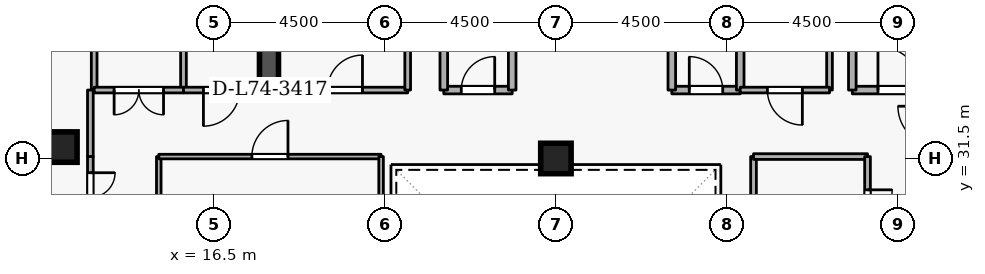
"""IFC4 building model, lengths in metres.
Left out: names, types, materials, properties, quantities, classifications, styles, units other than length and angle.
Written with IfcOpenShell. Run it as: python <this file> out.ifc"""

import sys

from ifc_helpers import new_model, si_unit, direction, frame, frame_2d, origin, origin_2d, place, context, subcontext, project, spatial, rectangle, extrude, element, fill, save


model = new_model("IFC4")
c1 = context("Model", 3, precision=1e-05, world=origin(), true_north=direction((0.0, 1.0)))
c2 = subcontext(c1, "Body", "Model", "MODEL_VIEW")
j1 = project(units=[si_unit("LENGTHUNIT", "METRE"), si_unit("PLANEANGLEUNIT", "RADIAN")], contexts=[c1])
p1 = place(None, origin())
s1 = spatial("IfcSite", under=j1, at=p1, CompositionType="ELEMENT")
p2 = place(p1, origin())
s2 = spatial("IfcBuilding", under=s1, at=p2, CompositionType="ELEMENT")
p3 = place(p2, frame((0.0, 0.0, 276.3)))
s3 = spatial("IfcBuildingStorey", under=s2, at=p3, CompositionType="ELEMENT", Elevation=276.3)
p4 = place(p3, frame((17.95, 33.1, 0.0), z_axis=(0.0, 0.0, 1.0), x_axis=(0.0, 1.0, 0.0)))
e1 = element("IfcWall", 1, at=p4, inside=s3, PredefinedType="SHEAR", context=c2, shape_type="SweptSolid", body=[
    extrude(rectangle(XDim=5.8, YDim=0.5, at=frame_2d((2.9, 0.0))), origin(), (0.0, 0.0, 1.0), 3.6),
])
for number, where, z_axis, x_axis in (
    (2, (12.5, 31.8, 0.0), (0.0, 0.0, 1.0), (1.0, 0.0, 0.0)),
    (3, (25.5, 31.5, 0.0), (0.0, 0.0, 1.0), (1.0, 0.0, 0.0)),
):
    element("IfcColumn", number, at=place(p3, frame(where, z_axis=z_axis, x_axis=x_axis)), inside=s3, PredefinedType="COLUMN", context=c2, shape_type="SweptSolid", body=[
        extrude(rectangle(XDim=0.8, YDim=0.8, at=origin_2d()), origin(), (0.0, 0.0, 1.0), 3.6),
    ])
p5 = place(p3, frame((33.3, 33.3, 0.0), z_axis=(0.0, 0.0, 1.0), x_axis=(1.0, 0.0, 0.0)))
e4 = element("IfcWall", 4, at=p5, inside=s3, PredefinedType="STANDARD", context=c2, shape_type="SweptSolid", body=[
    extrude(rectangle(XDim=2.5, YDim=0.2, at=frame_2d((1.25, 0.0))), origin(), (0.0, 0.0, 1.0), 3.26),
])
p6 = place(p5, frame((0.675, 0.0, 0.0)))
e5 = element("IfcOpeningElement", 5, at=p6, cuts=e4, PredefinedType="OPENING", context=c2, shape_type="SweptSolid", body=[
    extrude(rectangle(XDim=1.15, YDim=2.1, at=frame_2d((0.575, 1.05))), frame((0.0, 0.11, 0.0), z_axis=(0.0, -1.0, 0.0), x_axis=(1.0, 0.0, 0.0)), (0.0, 0.0, 1.0), 0.22),
])
p7 = place(p3, frame((33.3, 35.6, 0.0), z_axis=(0.0, 0.0, 1.0), x_axis=(0.0, -1.0, 0.0)))
e6 = element("IfcWall", 6, at=p7, inside=s3, PredefinedType="STANDARD", context=c2, shape_type="SweptSolid", body=[
    extrude(rectangle(XDim=2.3, YDim=0.2, at=frame_2d((1.15, 0.0))), origin(), (0.0, 0.0, 1.0), 2.465),
])
p8 = place(p3, frame((22.55, 33.3, 0.0), z_axis=(0.0, 0.0, 1.0), x_axis=(1.0, 0.0, 0.0)))
e7 = element("IfcWall", 7, at=p8, inside=s3, PredefinedType="STANDARD", context=c2, shape_type="SweptSolid", body=[
    extrude(rectangle(XDim=1.8, YDim=0.2, at=frame_2d((0.9, 0.0))), origin(), (0.0, 0.0, 1.0), 3.26),
])
p9 = place(p8, frame((0.46, 0.0, 0.0)))
e8 = element("IfcOpeningElement", 8, at=p9, cuts=e7, PredefinedType="OPENING", context=c2, shape_type="SweptSolid", body=[
    extrude(rectangle(XDim=0.88, YDim=2.04, at=frame_2d((0.44, 1.02))), frame((0.0, 0.11, 0.0), z_axis=(0.0, -1.0, 0.0), x_axis=(1.0, 0.0, 0.0)), (0.0, 0.0, 1.0), 0.22),
])
for number, where, z_axis, x_axis in (
    (9, (24.35, 33.3, 0.0), (0.0, 0.0, 1.0), (0.0, 1.0, 0.0)),
    (10, (22.55, 35.35, 0.0), (0.0, 0.0, 1.0), (0.0, -1.0, 0.0)),
):
    element("IfcWall", number, at=place(p3, frame(where, z_axis=z_axis, x_axis=x_axis)), inside=s3, PredefinedType="STANDARD", context=c2, shape_type="SweptSolid", body=[
        extrude(rectangle(XDim=2.05, YDim=0.2, at=frame_2d((1.025, 0.0))), origin(), (0.0, 0.0, 1.0), 3.26),
    ])
p10 = place(p3, frame((28.55, 33.3, 0.0), z_axis=(0.0, 0.0, 1.0), x_axis=(1.0, 0.0, 0.0)))
e11 = element("IfcWall", 11, at=p10, inside=s3, PredefinedType="STANDARD", context=c2, shape_type="SweptSolid", body=[
    extrude(rectangle(XDim=1.8, YDim=0.2, at=frame_2d((0.9, 0.0))), origin(), (0.0, 0.0, 1.0), 3.26),
])
p11 = place(p10, frame((0.46, 0.0, 0.0)))
e12 = element("IfcOpeningElement", 12, at=p11, cuts=e11, PredefinedType="OPENING", context=c2, shape_type="SweptSolid", body=[
    extrude(rectangle(XDim=0.88, YDim=2.04, at=frame_2d((0.44, 1.02))), frame((0.0, 0.11, 0.0), z_axis=(0.0, -1.0, 0.0), x_axis=(1.0, 0.0, 0.0)), (0.0, 0.0, 1.0), 0.22),
])
for number, where, z_axis, x_axis in (
    (13, (30.35, 33.3, 0.0), (0.0, 0.0, 1.0), (0.0, 1.0, 0.0)),
    (14, (28.55, 35.35, 0.0), (0.0, 0.0, 1.0), (0.0, -1.0, 0.0)),
):
    element("IfcWall", number, at=place(p3, frame(where, z_axis=z_axis, x_axis=x_axis)), inside=s3, PredefinedType="STANDARD", context=c2, shape_type="SweptSolid", body=[
        extrude(rectangle(XDim=2.05, YDim=0.2, at=frame_2d((1.025, 0.0))), origin(), (0.0, 0.0, 1.0), 3.26),
    ])
p12 = place(p3, frame((18.3, 33.3, 0.0), z_axis=(0.0, 0.0, 1.0), x_axis=(1.0, 0.0, 0.0)))
e15 = element("IfcWall", 15, at=p12, inside=s3, PredefinedType="PARTITIONING", context=c2, shape_type="SweptSolid", body=[
    extrude(rectangle(XDim=3.3, YDim=0.15, at=frame_2d((1.65, 0.0))), origin(), (0.0, 0.0, 1.0), 3.26),
])
p13 = place(p12, frame((1.19, 0.0, 0.0)))
e16 = element("IfcOpeningElement", 16, at=p13, cuts=e15, PredefinedType="OPENING", context=c2, shape_type="SweptSolid", body=[
    extrude(rectangle(XDim=0.92, YDim=2.08, at=frame_2d((0.46, 1.04))), frame((0.0, 0.085, 0.0), z_axis=(0.0, -1.0, 0.0), x_axis=(1.0, 0.0, 0.0)), (0.0, 0.0, 1.0), 0.17),
])
p14 = place(p3, frame((21.6, 33.3, 0.0), z_axis=(0.0, 0.0, 1.0), x_axis=(0.0, 1.0, 0.0)))
e17 = element("IfcWall", 17, at=p14, inside=s3, PredefinedType="PARTITIONING", context=c2, shape_type="SweptSolid", body=[
    extrude(rectangle(XDim=2.05, YDim=0.15, at=frame_2d((1.025, 0.0))), origin(), (0.0, 0.0, 1.0), 3.26),
])
p15 = place(p3, frame((32.7, 35.35, 0.0), z_axis=(0.0, 0.0, 1.0), x_axis=(0.0, -1.0, 0.0)))
e18 = element("IfcWall", 18, at=p15, inside=s3, PredefinedType="PARTITIONING", context=c2, shape_type="SweptSolid", body=[
    extrude(rectangle(XDim=2.05, YDim=0.15, at=frame_2d((1.025, 0.0))), origin(), (0.0, 0.0, 1.0), 2.465),
])
p16 = place(p3, frame((32.7, 33.3, 0.0), z_axis=(0.0, 0.0, 1.0), x_axis=(-1.0, 0.0, 0.0)))
e19 = element("IfcWall", 19, at=p16, inside=s3, PredefinedType="PARTITIONING", context=c2, shape_type="SweptSolid", body=[
    extrude(rectangle(XDim=2.35, YDim=0.15, at=frame_2d((1.175, 0.0))), origin(), (0.0, 0.0, 1.0), 3.26),
])
p17 = place(p16, frame((0.715, 0.0, 0.0)))
e20 = element("IfcOpeningElement", 20, at=p17, cuts=e19, PredefinedType="OPENING", context=c2, shape_type="SweptSolid", body=[
    extrude(rectangle(XDim=0.92, YDim=2.08, at=frame_2d((0.46, 1.04))), frame((0.0, 0.085, 0.0), z_axis=(0.0, -1.0, 0.0), x_axis=(1.0, 0.0, 0.0)), (0.0, 0.0, 1.0), 0.17),
])
for number, where, z_axis, x_axis in (
    (21, (13.35, 33.3, 0.0), (0.0, 0.0, 1.0), (0.0, 1.0, 0.0)),
    (22, (15.7, 44.72, 0.0), (0.0, 0.0, 1.0), (0.0, -1.0, 0.0)),
):
    element("IfcWall", number, at=place(p3, frame(where, z_axis=z_axis, x_axis=x_axis)), inside=s3, PredefinedType="PARTITIONING", context=c2, shape_type="SweptSolid", body=[
        extrude(rectangle(XDim=11.42, YDim=0.15, at=frame_2d((5.71, 0.0))), origin(), (0.0, 0.0, 1.0), 3.26),
    ])
p18 = place(p3, frame((15.7, 33.3, 0.0), z_axis=(0.0, 0.0, 1.0), x_axis=(-1.0, 0.0, 0.0)))
e23 = element("IfcWall", 23, at=p18, inside=s3, PredefinedType="PARTITIONING", context=c2, shape_type="SweptSolid", body=[
    extrude(rectangle(XDim=2.35, YDim=0.15, at=frame_2d((1.175, 0.0))), origin(), (0.0, 0.0, 1.0), 3.26),
])
p19 = place(p18, frame((0.525, 0.0, 0.0)))
e24 = element("IfcOpeningElement", 24, at=p19, cuts=e23, PredefinedType="OPENING", context=c2, shape_type="SweptSolid", body=[
    extrude(rectangle(XDim=1.3, YDim=2.12, at=frame_2d((0.65, 1.06))), frame((0.0, 0.085, 0.0), z_axis=(0.0, -1.0, 0.0), x_axis=(1.0, 0.0, 0.0)), (0.0, 0.0, 1.0), 0.17),
])
p20 = place(p3, frame((17.7, 33.3, 0.0), z_axis=(0.0, 0.0, 1.0), x_axis=(-1.0, 0.0, 0.0)))
e25 = element("IfcWall", 25, at=p20, inside=s3, PredefinedType="PARTITIONING", context=c2, shape_type="SweptSolid", body=[
    extrude(rectangle(XDim=2.0, YDim=0.15, at=frame_2d((1.0, 0.0))), origin(), (0.0, 0.0, 1.0), 3.26),
])
p21 = place(p20, frame((0.525, 0.0, 0.0)))
e26 = element("IfcOpeningElement", 26, at=p21, cuts=e25, PredefinedType="OPENING", context=c2, shape_type="SweptSolid", body=[
    extrude(rectangle(XDim=0.95, YDim=2.1, at=frame_2d((0.475, 1.05))), frame((0.0, 0.085, 0.0), z_axis=(0.0, -1.0, 0.0), x_axis=(1.0, 0.0, 0.0)), (0.0, 0.0, 1.0), 0.17),
])
p22 = place(p3, frame((13.25, 33.3, 0.0), z_axis=(0.0, 0.0, 1.0), x_axis=(0.0, -1.0, 0.0)))
e27 = element("IfcWall", 27, at=p22, inside=s3, PredefinedType="PARTITIONING", context=c2, shape_type="SweptSolid", body=[
    extrude(rectangle(XDim=1.75, YDim=0.15, at=frame_2d((0.875, 0.0))), origin(), (0.0, 0.0, 1.0), 3.26),
])
p23 = place(p3, frame((13.25, 31.55, 0.0), z_axis=(0.0, 0.0, 1.0), x_axis=(0.0, -1.0, 0.0)))
e28 = element("IfcWall", 28, at=p23, inside=s3, PredefinedType="PARTITIONING", context=c2, shape_type="SweptSolid", body=[
    extrude(rectangle(XDim=2.15, YDim=0.15, at=frame_2d((1.075, 0.0))), origin(), (0.0, 0.0, 1.0), 3.26),
])
p24 = place(p23, frame((0.425, 0.0, 0.0)))
e29 = element("IfcOpeningElement", 29, at=p24, cuts=e28, PredefinedType="OPENING", context=c2, shape_type="SweptSolid", body=[
    extrude(rectangle(XDim=1.3, YDim=2.12, at=frame_2d((0.65, 1.06))), frame((0.0, 0.085, 0.0), z_axis=(0.0, -1.0, 0.0), x_axis=(1.0, 0.0, 0.0)), (0.0, 0.0, 1.0), 0.17),
])
p25 = place(p3, frame((15.05, 26.2, 0.0), z_axis=(0.0, 0.0, 1.0), x_axis=(0.0, 1.0, 0.0)))
e30 = element("IfcWall", 30, at=p25, inside=s3, PredefinedType="PARTITIONING", context=c2, shape_type="SweptSolid", body=[
    extrude(rectangle(XDim=5.35, YDim=0.12, at=frame_2d((2.675, 0.0))), origin(), (0.0, 0.0, 1.0), 3.26),
])
p26 = place(p3, frame((15.05, 31.55, 0.0), z_axis=(0.0, 0.0, 1.0), x_axis=(1.0, 0.0, 0.0)))
e31 = element("IfcWall", 31, at=p26, inside=s3, PredefinedType="PARTITIONING", context=c2, shape_type="SweptSolid", body=[
    extrude(rectangle(XDim=5.85, YDim=0.12, at=frame_2d((2.925, 0.0))), origin(), (0.0, 0.0, 1.0), 3.26),
])
p27 = place(p26, frame((2.45, 0.0, 0.0)))
e32 = element("IfcOpeningElement", 32, at=p27, cuts=e31, PredefinedType="OPENING", context=c2, shape_type="SweptSolid", body=[
    extrude(rectangle(XDim=0.95, YDim=2.1, at=frame_2d((0.475, 1.05))), frame((0.0, 0.07, 0.0), z_axis=(0.0, -1.0, 0.0), x_axis=(1.0, 0.0, 0.0)), (0.0, 0.0, 1.0), 0.14),
])
p28 = place(p3, frame((20.9, 31.55, 0.0), z_axis=(0.0, 0.0, 1.0), x_axis=(0.0, -1.0, 0.0)))
e33 = element("IfcWall", 33, at=p28, inside=s3, PredefinedType="PARTITIONING", context=c2, shape_type="SweptSolid", body=[
    extrude(rectangle(XDim=5.35, YDim=0.12, at=frame_2d((2.675, 0.0))), origin(), (0.0, 0.0, 1.0), 3.26),
])
p29 = place(p3, frame((30.7, 28.5, 0.0), z_axis=(0.0, 0.0, 1.0), x_axis=(0.0, 1.0, 0.0)))
e34 = element("IfcWall", 34, at=p29, inside=s3, PredefinedType="PARTITIONING", context=c2, shape_type="SweptSolid", body=[
    extrude(rectangle(XDim=3.05, YDim=0.15, at=frame_2d((1.525, 0.0))), origin(), (0.0, 0.0, 1.0), 3.26),
])
p30 = place(p3, frame((30.7, 31.55, 0.0), z_axis=(0.0, 0.0, 1.0), x_axis=(1.0, 0.0, 0.0)))
e35 = element("IfcWall", 35, at=p30, inside=s3, PredefinedType="PARTITIONING", context=c2, shape_type="SweptSolid", body=[
    extrude(rectangle(XDim=3.0, YDim=0.15, at=frame_2d((1.5, 0.0))), origin(), (0.0, 0.0, 1.0), 3.26),
])
p31 = place(p3, frame((33.7, 31.55, 0.0), z_axis=(0.0, 0.0, 1.0), x_axis=(0.0, -1.0, 0.0)))
e36 = element("IfcWall", 36, at=p31, inside=s3, PredefinedType="PARTITIONING", context=c2, shape_type="SweptSolid", body=[
    extrude(rectangle(XDim=3.05, YDim=0.15, at=frame_2d((1.525, 0.0))), origin(), (0.0, 0.0, 1.0), 3.26),
])
p32 = place(p31, frame((0.875, 0.0, 0.0)))
e37 = element("IfcOpeningElement", 37, at=p32, cuts=e36, PredefinedType="OPENING", context=c2, shape_type="SweptSolid", body=[
    extrude(rectangle(XDim=1.3, YDim=2.12, at=frame_2d((0.65, 1.06))), frame((0.0, 0.085, 0.0), z_axis=(0.0, -1.0, 0.0), x_axis=(1.0, 0.0, 0.0)), (0.0, 0.0, 1.0), 0.17),
])
p33 = place(p6, origin())
e38 = element("IfcDoor", 38, at=p33, inside=s3, OperationType="SINGLE_SWING_LEFT", PredefinedType="DOOR", context=c2, shape_type="SweptSolid", body=[
    extrude(rectangle(XDim=1.15, YDim=2.1, at=frame_2d((0.575, 1.05))), frame((0.0, 0.025, 0.0), z_axis=(0.0, -1.0, 0.0), x_axis=(1.0, 0.0, 0.0)), (0.0, 0.0, 1.0), 0.05),
])
fill(e5, e38)
p34 = place(p9, origin())
e39 = element("IfcDoor", 39, at=p34, inside=s3, OperationType="SINGLE_SWING_RIGHT", PredefinedType="DOOR", context=c2, shape_type="SweptSolid", body=[
    extrude(rectangle(XDim=0.88, YDim=2.04, at=frame_2d((0.44, 1.02))), frame((0.0, 0.025, 0.0), z_axis=(0.0, -1.0, 0.0), x_axis=(1.0, 0.0, 0.0)), (0.0, 0.0, 1.0), 0.05),
])
fill(e8, e39)
p35 = place(p11, origin())
e40 = element("IfcDoor", 40, at=p35, inside=s3, OperationType="SINGLE_SWING_LEFT", PredefinedType="DOOR", context=c2, shape_type="SweptSolid", body=[
    extrude(rectangle(XDim=0.88, YDim=2.04, at=frame_2d((0.44, 1.02))), frame((0.0, 0.025, 0.0), z_axis=(0.0, -1.0, 0.0), x_axis=(1.0, 0.0, 0.0)), (0.0, 0.0, 1.0), 0.05),
])
fill(e12, e40)
p36 = place(p13, origin())
e41 = element("IfcDoor", 41, at=p36, inside=s3, OperationType="SINGLE_SWING_RIGHT", PredefinedType="DOOR", context=c2, shape_type="SweptSolid", body=[
    extrude(rectangle(XDim=0.92, YDim=2.08, at=frame_2d((0.46, 1.04))), frame((0.0, 0.025, 0.0), z_axis=(0.0, -1.0, 0.0), x_axis=(1.0, 0.0, 0.0)), (0.0, 0.0, 1.0), 0.05),
])
fill(e16, e41)
p37 = place(p17, origin())
e42 = element("IfcDoor", 42, at=p37, inside=s3, OperationType="SINGLE_SWING_LEFT", PredefinedType="DOOR", context=c2, shape_type="SweptSolid", body=[
    extrude(rectangle(XDim=0.92, YDim=2.08, at=frame_2d((0.46, 1.04))), frame((0.0, 0.025, 0.0), z_axis=(0.0, -1.0, 0.0), x_axis=(1.0, 0.0, 0.0)), (0.0, 0.0, 1.0), 0.05),
])
fill(e20, e42)
p38 = place(p19, origin())
e43 = element("IfcDoor", 43, at=p38, inside=s3, OperationType="DOUBLE_DOOR_SINGLE_SWING", PredefinedType="DOOR", context=c2, shape_type="SweptSolid", body=[
    extrude(rectangle(XDim=1.3, YDim=2.12, at=frame_2d((0.65, 1.06))), frame((0.0, 0.025, 0.0), z_axis=(0.0, -1.0, 0.0), x_axis=(1.0, 0.0, 0.0)), (0.0, 0.0, 1.0), 0.05),
])
fill(e24, e43)
p39 = place(p21, origin())
e44 = element("IfcDoor", 44, at=p39, inside=s3, OperationType="SINGLE_SWING_RIGHT", PredefinedType="DOOR", context=c2, shape_type="SweptSolid", body=[
    extrude(rectangle(XDim=0.95, YDim=2.1, at=frame_2d((0.475, 1.05))), frame((0.0, 0.025, 0.0), z_axis=(0.0, -1.0, 0.0), x_axis=(1.0, 0.0, 0.0)), (0.0, 0.0, 1.0), 0.05),
])
fill(e26, e44)
p40 = place(p24, origin())
e45 = element("IfcDoor", 45, at=p40, inside=s3, OperationType="DOUBLE_DOOR_SINGLE_SWING", PredefinedType="DOOR", context=c2, shape_type="SweptSolid", body=[
    extrude(rectangle(XDim=1.3, YDim=2.12, at=frame_2d((0.65, 1.06))), frame((0.0, 0.025, 0.0), z_axis=(0.0, -1.0, 0.0), x_axis=(1.0, 0.0, 0.0)), (0.0, 0.0, 1.0), 0.05),
])
fill(e29, e45)
p41 = place(p27, origin())
e46 = element("IfcDoor", 46, at=p41, inside=s3, OperationType="SINGLE_SWING_RIGHT", PredefinedType="DOOR", context=c2, shape_type="SweptSolid", body=[
    extrude(rectangle(XDim=0.95, YDim=2.1, at=frame_2d((0.475, 1.05))), frame((0.0, 0.025, 0.0), z_axis=(0.0, -1.0, 0.0), x_axis=(1.0, 0.0, 0.0)), (0.0, 0.0, 1.0), 0.05),
])
fill(e32, e46)
p42 = place(p32, origin())
e47 = element("IfcDoor", 47, at=p42, inside=s3, OperationType="DOUBLE_DOOR_SINGLE_SWING", PredefinedType="DOOR", context=c2, shape_type="SweptSolid", body=[
    extrude(rectangle(XDim=1.3, YDim=2.12, at=frame_2d((0.65, 1.06))), frame((0.0, 0.025, 0.0), z_axis=(0.0, -1.0, 0.0), x_axis=(1.0, 0.0, 0.0)), (0.0, 0.0, 1.0), 0.05),
])
fill(e37, e47)
save(model, sys.argv[1])
